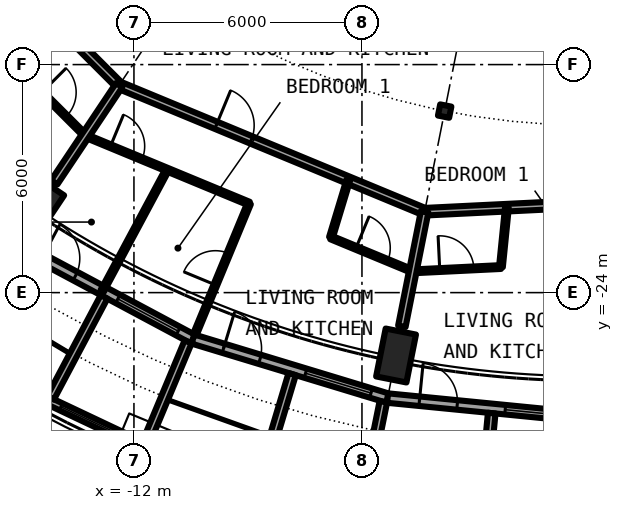
"""IFC4 building model, lengths in metres.
Left out: names, types, materials, properties, quantities, classifications, styles, units other than length and angle.
Written with IfcOpenShell. Run it as: python <this file> out.ifc"""

import sys

from ifc_helpers import new_model, si_unit, direction, frame, frame_2d, origin, origin_2d, place, context, subcontext, project, spatial, rectangle, circle, hollow_circle, i_section, extrude, element, fill, save


model = new_model("IFC4")
c1 = context("Model", 3, precision=1e-05, world=origin(), true_north=direction((0.0, 1.0)))
c2 = subcontext(c1, "Body", "Model", "MODEL_VIEW")
j1 = project(units=[si_unit("LENGTHUNIT", "METRE"), si_unit("PLANEANGLEUNIT", "RADIAN")], contexts=[c1])
p1 = place(None, origin())
s1 = spatial("IfcSite", under=j1, at=p1, CompositionType="ELEMENT")
p2 = place(p1, origin())
s2 = spatial("IfcBuilding", under=s1, at=p2, CompositionType="ELEMENT")
p3 = place(p2, frame((0.0, 0.0, 234.05)))
s3 = spatial("IfcBuildingStorey", under=s2, at=p3, CompositionType="ELEMENT", Elevation=234.05)
p4 = place(p3, frame((-14.889, -22.283, 0.0), z_axis=(0.231777820067, 0.346913947437, 0.908806775502), x_axis=(-0.831494710184, 0.555532669549, 0.0)))
e1 = element("IfcColumn", 1, at=p4, inside=s3, PredefinedType="COLUMN", context=c2, shape_type="SweptSolid", body=[
    extrude(hollow_circle(Radius=0.406, WallThickness=0.03, at=origin_2d()), origin(), (0.0, 0.0, 1.0), 3.081),
])
p5 = place(p3, frame((-5.229, -26.285, 0.0), z_axis=(0.081382632414, 0.409131968018, 0.908838764516), x_axis=(-0.980784718923, 0.195093144748, 0.0)))
e2 = element("IfcColumn", 2, at=p5, inside=s3, PredefinedType="COLUMN", context=c2, shape_type="SweptSolid", body=[
    extrude(hollow_circle(Radius=0.406, WallThickness=0.03, at=origin_2d()), origin(), (0.0, 0.0, 1.0), 3.081),
])
p6 = place(p3, frame((-3.824, -19.223, 0.0), z_axis=(0.0, 0.0, 1.0), x_axis=(-0.195090322016, -0.980785280403, 0.0)))
e3 = element("IfcColumn", 3, at=p6, inside=s3, PredefinedType="COLUMN", context=c2, shape_type="SweptSolid", body=[
    extrude(i_section(OverallWidth=0.3, OverallDepth=0.3, WebThickness=0.011, FlangeThickness=0.019, FilletRadius=0.027, at=origin_2d()), origin(), (0.0, 0.0, 1.0), 3.05),
])
p7 = place(p3, frame((-15.167, -22.699, 0.0), z_axis=(0.0, 0.0, 1.0), x_axis=(0.881915646801, -0.471407246368, 0.0)))
e4 = element("IfcWall", 4, at=p7, inside=s3, PredefinedType="SOLIDWALL", context=c2, shape_type="SweptSolid", body=[
    extrude(rectangle(XDim=5.352, YDim=0.25, at=frame_2d((2.676, 0.0))), origin(), (0.0, 0.0, 1.0), 2.7),
])
p8 = place(p7, frame((0.841, 0.0, 0.0)))
e5 = element("IfcOpeningElement", 5, at=p8, cuts=e4, PredefinedType="OPENING", context=c2, shape_type="SweptSolid", body=[
    extrude(rectangle(XDim=1.0, YDim=2.2, at=frame_2d((0.5, 1.1))), frame((0.0, 0.135, 0.0), z_axis=(0.0, -1.0, 0.0), x_axis=(1.0, 0.0, 0.0)), (0.0, 0.0, 1.0), 0.27),
])
p9 = place(p7, frame((3.111, 0.0, 0.3)))
e6 = element("IfcOpeningElement", 6, at=p9, cuts=e4, PredefinedType="OPENING", context=c2, shape_type="SweptSolid", body=[
    extrude(rectangle(XDim=1.8, YDim=2.1, at=frame_2d((0.9, 1.05))), frame((0.0, 0.135, 0.0), z_axis=(0.0, -1.0, 0.0), x_axis=(1.0, 0.0, 0.0)), (0.0, 0.0, 1.0), 0.27),
])
p10 = place(p3, frame((-14.335, -26.808, -0.03), z_axis=(0.0, 0.0, 1.0), x_axis=(0.904000060331, -0.427532327342, 0.0)))
e7 = element("IfcWall", 7, at=p10, inside=s3, PredefinedType="SOLIDWALL", context=c2, shape_type="SweptSolid", body=[
    extrude(rectangle(XDim=2.993, YDim=0.2, at=frame_2d((1.497, 0.0))), origin(), (0.0, 0.0, 1.0), 2.73),
])
p11 = place(p10, frame((0.457, 0.0, 0.33)))
e8 = element("IfcOpeningElement", 8, at=p11, cuts=e7, PredefinedType="OPENING", context=c2, shape_type="SweptSolid", body=[
    extrude(circle(Radius=1.04, at=frame_2d((1.04, 1.04))), frame((0.0, 0.11, 0.0), z_axis=(0.0, -1.0, 0.0), x_axis=(1.0, 0.0, 0.0)), (0.0, 0.0, 1.0), 0.22),
])
p12 = place(p3, frame((-12.787, -24.113, -0.03), z_axis=(0.0, 0.0, 1.0), x_axis=(-0.468365282436, -0.883534924159, 0.0)))
e9 = element("IfcWall", 9, at=p12, inside=s3, PredefinedType="SOLIDWALL", context=c2, shape_type="SweptSolid", body=[
    extrude(rectangle(XDim=3.006, YDim=0.2, at=frame_2d((1.503, 0.0))), origin(), (0.0, 0.0, 1.0), 2.73),
])
p13 = place(p3, frame((-10.575, -25.295, -0.03), z_axis=(0.0, 0.0, 1.0), x_axis=(-0.385697364644, -0.922625353492, 0.0)))
e10 = element("IfcWall", 10, at=p13, inside=s3, PredefinedType="SOLIDWALL", context=c2, shape_type="SweptSolid", body=[
    extrude(rectangle(XDim=2.883, YDim=0.2, at=frame_2d((1.442, 0.0))), origin(), (0.0, 0.0, 1.0), 2.73),
])
p14 = place(p3, frame((-10.447, -25.222, 0.0), z_axis=(0.0, 0.0, 1.0), x_axis=(0.956965678721, -0.290201119486, 0.0)))
e11 = element("IfcWall", 11, at=p14, inside=s3, PredefinedType="SOLIDWALL", context=c2, shape_type="SweptSolid", body=[
    extrude(rectangle(XDim=5.351, YDim=0.25, at=frame_2d((2.676, 0.0))), origin(), (0.0, 0.0, 1.0), 2.7),
])
p15 = place(p14, frame((0.841, 0.0, 0.0)))
e12 = element("IfcOpeningElement", 12, at=p15, cuts=e11, PredefinedType="OPENING", context=c2, shape_type="SweptSolid", body=[
    extrude(rectangle(XDim=1.0, YDim=2.2, at=frame_2d((0.5, 1.1))), frame((0.0, 0.135, 0.0), z_axis=(0.0, -1.0, 0.0), x_axis=(1.0, 0.0, 0.0)), (0.0, 0.0, 1.0), 0.27),
])
p16 = place(p14, frame((3.096, 0.0, 0.3)))
e13 = element("IfcOpeningElement", 13, at=p16, cuts=e11, PredefinedType="OPENING", context=c2, shape_type="SweptSolid", body=[
    extrude(rectangle(XDim=1.8, YDim=2.1, at=frame_2d((0.9, 1.05))), frame((0.0, 0.135, 0.0), z_axis=(0.0, -1.0, 0.0), x_axis=(1.0, 0.0, 0.0)), (0.0, 0.0, 1.0), 0.27),
])
p17 = place(p3, frame((-7.837, -26.144, -0.03), z_axis=(0.0, 0.0, 1.0), x_axis=(-0.287064767992, -0.957911174889, 0.0)))
e14 = element("IfcWall", 14, at=p17, inside=s3, PredefinedType="SOLIDWALL", context=c2, shape_type="SweptSolid", body=[
    extrude(rectangle(XDim=3.006, YDim=0.2, at=frame_2d((1.503, 0.0))), origin(), (0.0, 0.0, 1.0), 2.73),
])
p18 = place(p3, frame((-5.437, -26.872, -0.03), z_axis=(0.0, 0.0, 1.0), x_axis=(-0.198395337493, -0.980122079162, 0.0)))
e15 = element("IfcWall", 15, at=p18, inside=s3, PredefinedType="SOLIDWALL", context=c2, shape_type="SweptSolid", body=[
    extrude(rectangle(XDim=2.883, YDim=0.2, at=frame_2d((1.442, 0.0))), origin(), (0.0, 0.0, 1.0), 2.73),
])
p19 = place(p3, frame((-5.326, -26.775, 0.0), z_axis=(0.0, 0.0, 1.0), x_axis=(0.995173996315, -0.098126026407, 0.0)))
e16 = element("IfcWall", 16, at=p19, inside=s3, PredefinedType="SOLIDWALL", context=c2, shape_type="SweptSolid", body=[
    extrude(rectangle(XDim=5.352, YDim=0.25, at=frame_2d((2.676, 0.0))), origin(), (0.0, 0.0, 1.0), 2.7),
])
p20 = place(p19, frame((0.841, 0.0, 0.0)))
e17 = element("IfcOpeningElement", 17, at=p20, cuts=e16, PredefinedType="OPENING", context=c2, shape_type="SweptSolid", body=[
    extrude(rectangle(XDim=1.0, YDim=2.2, at=frame_2d((0.5, 1.1))), frame((0.0, 0.135, 0.0), z_axis=(0.0, -1.0, 0.0), x_axis=(1.0, 0.0, 0.0)), (0.0, 0.0, 1.0), 0.27),
])
p21 = place(p19, frame((3.111, 0.0, 0.3)))
e18 = element("IfcOpeningElement", 18, at=p21, cuts=e16, PredefinedType="OPENING", context=c2, shape_type="SweptSolid", body=[
    extrude(rectangle(XDim=1.8, YDim=2.1, at=frame_2d((0.9, 1.05))), frame((0.0, 0.135, 0.0), z_axis=(0.0, -1.0, 0.0), x_axis=(1.0, 0.0, 0.0)), (0.0, 0.0, 1.0), 0.27),
])
p22 = place(p3, frame((-2.586, -27.171, -0.03), z_axis=(0.0, 0.0, 1.0), x_axis=(-0.094548432284, -0.995520262954, 0.0)))
e19 = element("IfcWall", 19, at=p22, inside=s3, PredefinedType="SOLIDWALL", context=c2, shape_type="SweptSolid", body=[
    extrude(rectangle(XDim=3.006, YDim=0.2, at=frame_2d((1.503, 0.0))), origin(), (0.0, 0.0, 1.0), 2.73),
])
p23 = place(p3, frame((-14.927, -18.224, 0.0), z_axis=(0.0, 0.0, 1.0), x_axis=(0.707316201218, -0.706897299114, 0.0)))
e20 = element("IfcWall", 20, at=p23, inside=s3, PredefinedType="PARTITIONING", context=c2, shape_type="SweptSolid", body=[
    extrude(rectangle(XDim=2.331, YDim=0.1, at=frame_2d((1.166, 0.0))), origin(), (0.0, 0.0, 1.0), 2.7),
])
p24 = place(p23, frame((0.716, 0.0, 0.0)))
e21 = element("IfcOpeningElement", 21, at=p24, cuts=e20, PredefinedType="OPENING", context=c2, shape_type="SweptSolid", body=[
    extrude(rectangle(XDim=0.9, YDim=2.3, at=frame_2d((0.45, 1.15))), frame((0.0, 0.06, 0.0), z_axis=(0.0, -1.0, 0.0), x_axis=(1.0, 0.0, 0.0)), (0.0, 0.0, 1.0), 0.12),
])
p25 = place(p3, frame((-13.278, -19.873, 0.0), z_axis=(0.0, 0.0, 1.0), x_axis=(0.923920484476, -0.38258455061, 0.0)))
e22 = element("IfcWall", 22, at=p25, inside=s3, PredefinedType="PARTITIONING", context=c2, shape_type="SweptSolid", body=[
    extrude(rectangle(XDim=4.663, YDim=0.1, at=frame_2d((2.332, 0.0))), origin(), (0.0, 0.0, 1.0), 2.7),
])
p26 = place(p25, frame((0.715, 0.0, 0.0)))
e23 = element("IfcOpeningElement", 23, at=p26, cuts=e22, PredefinedType="OPENING", context=c2, shape_type="SweptSolid", body=[
    extrude(rectangle(XDim=0.9, YDim=2.3, at=frame_2d((0.45, 1.15))), frame((0.0, 0.06, 0.0), z_axis=(0.0, -1.0, 0.0), x_axis=(1.0, 0.0, 0.0)), (0.0, 0.0, 1.0), 0.12),
])
p27 = place(p3, frame((-6.817, -22.549, 0.0), z_axis=(0.0, 0.0, 1.0), x_axis=(0.923923664861, -0.382576870068, 0.0)))
e24 = element("IfcWall", 24, at=p27, inside=s3, PredefinedType="PARTITIONING", context=c2, shape_type="SweptSolid", body=[
    extrude(rectangle(XDim=2.331, YDim=0.1, at=frame_2d((1.166, 0.0))), origin(), (0.0, 0.0, 1.0), 2.7),
])
p28 = place(p27, frame((0.716, 0.0, 0.0)))
e25 = element("IfcOpeningElement", 25, at=p28, cuts=e24, PredefinedType="OPENING", context=c2, shape_type="SweptSolid", body=[
    extrude(rectangle(XDim=0.9, YDim=2.3, at=frame_2d((0.45, 1.15))), frame((0.0, 0.06, 0.0), z_axis=(0.0, -1.0, 0.0), x_axis=(1.0, 0.0, 0.0)), (0.0, 0.0, 1.0), 0.12),
])
p29 = place(p3, frame((-4.67, -23.441, 0.0), z_axis=(0.0, 0.0, 1.0), x_axis=(0.998801754813, 0.04893929488, 0.0)))
e26 = element("IfcWall", 26, at=p29, inside=s3, PredefinedType="PARTITIONING", context=c2, shape_type="SweptSolid", body=[
    extrude(rectangle(XDim=2.33, YDim=0.1, at=frame_2d((1.165, 0.0))), origin(), (0.0, 0.0, 1.0), 2.7),
])
p30 = place(p29, frame((0.718, 0.0, 0.0)))
e27 = element("IfcOpeningElement", 27, at=p30, cuts=e26, PredefinedType="OPENING", context=c2, shape_type="SweptSolid", body=[
    extrude(rectangle(XDim=0.9, YDim=2.3, at=frame_2d((0.45, 1.15))), frame((0.0, 0.06, 0.0), z_axis=(0.0, -1.0, 0.0), x_axis=(1.0, 0.0, 0.0)), (0.0, 0.0, 1.0), 0.12),
])
p31 = place(p3, frame((-18.542, -12.389, 0.0), z_axis=(0.0, 0.0, 1.0), x_axis=(0.707106781187, -0.707106781187, 0.0)))
e28 = element("IfcWall", 28, at=p31, inside=s3, PredefinedType="PARTITIONING", context=c2, shape_type="SweptSolid", body=[
    extrude(rectangle(XDim=8.702, YDim=0.2, at=frame_2d((4.351, 0.0))), origin(), (0.0, 0.0, 1.0), 2.7),
])
p32 = place(p31, frame((2.763, 0.0, 0.0)))
e29 = element("IfcOpeningElement", 29, at=p32, cuts=e28, PredefinedType="OPENING", context=c2, shape_type="SweptSolid", body=[
    extrude(rectangle(XDim=1.0, YDim=2.3, at=frame_2d((0.5, 1.15))), frame((0.0, 0.11, 0.0), z_axis=(0.0, -1.0, 0.0), x_axis=(1.0, 0.0, 0.0)), (0.0, 0.0, 1.0), 0.22),
])
p33 = place(p3, frame((-12.389, -18.542, 0.0), z_axis=(0.0, 0.0, 1.0), x_axis=(0.923867858178, -0.382711615483, 0.0)))
e30 = element("IfcWall", 30, at=p33, inside=s3, PredefinedType="PARTITIONING", context=c2, shape_type="SweptSolid", body=[
    extrude(rectangle(XDim=8.709, YDim=0.2, at=frame_2d((4.354, 0.0))), origin(), (0.0, 0.0, 1.0), 2.7),
])
p34 = place(p33, frame((2.763, 0.0, 0.0)))
e31 = element("IfcOpeningElement", 31, at=p34, cuts=e30, PredefinedType="OPENING", context=c2, shape_type="SweptSolid", body=[
    extrude(rectangle(XDim=1.0, YDim=2.3, at=frame_2d((0.5, 1.15))), frame((0.0, 0.11, 0.0), z_axis=(0.0, -1.0, 0.0), x_axis=(1.0, 0.0, 0.0)), (0.0, 0.0, 1.0), 0.22),
])
p35 = place(p3, frame((-4.358, -21.872, 0.0), z_axis=(0.0, 0.0, 1.0), x_axis=(0.998795913445, 0.049058366102, 0.0)))
e32 = element("IfcWall", 32, at=p35, inside=s3, PredefinedType="PARTITIONING", context=c2, shape_type="SweptSolid", body=[
    extrude(rectangle(XDim=10.844, YDim=0.2, at=frame_2d((5.422, 0.0))), origin(), (0.0, 0.0, 1.0), 2.7),
])
p36 = place(p35, frame((6.009, 0.0, 0.0)))
e33 = element("IfcOpeningElement", 33, at=p36, cuts=e32, PredefinedType="OPENING", context=c2, shape_type="SweptSolid", body=[
    extrude(rectangle(XDim=1.0, YDim=2.3, at=frame_2d((0.5, 1.15))), frame((0.0, 0.11, 0.0), z_axis=(0.0, -1.0, 0.0), x_axis=(1.0, 0.0, 0.0)), (0.0, 0.0, 1.0), 0.22),
])
for number, where, z_axis, x_axis in (
    (34, (-14.927, -18.224, 0.0), (0.0, 0.0, 1.0), (0.634, 0.773, 0.0)),
    (35, (-6.817, -22.549, 0.0), (0.0, 0.0, 1.0), (0.29, 0.957, 0.0)),
):
    element("IfcWall", number, at=place(p3, frame(where, z_axis=z_axis, x_axis=x_axis)), inside=s3, PredefinedType="PARTITIONING", context=c2, shape_type="SweptSolid", body=[
        extrude(rectangle(XDim=1.578, YDim=0.1, at=frame_2d((0.789, 0.0))), origin(), (0.0, 0.0, 1.0), 2.7),
    ])
p37 = place(p3, frame((-14.097, -21.097, 0.0), z_axis=(0.0, 0.0, 1.0), x_axis=(0.555763018642, 0.831340764735, 0.0)))
e36 = element("IfcWall", 36, at=p37, inside=s3, PredefinedType="PARTITIONING", context=c2, shape_type="SweptSolid", body=[
    extrude(rectangle(XDim=3.073, YDim=0.2, at=frame_2d((1.537, 0.0))), origin(), (0.0, 0.0, 1.0), 2.7),
])
p38 = place(p3, frame((-12.833, -23.954, 0.0), z_axis=(0.0, 0.0, 1.0), x_axis=(0.472212052488, 0.881484984265, 0.0)))
e37 = element("IfcWall", 37, at=p38, inside=s3, PredefinedType="PARTITIONING", context=c2, shape_type="SweptSolid", body=[
    extrude(rectangle(XDim=3.619, YDim=0.1, at=frame_2d((1.81, 0.0))), origin(), (0.0, 0.0, 1.0), 2.7),
])
p39 = place(p3, frame((-10.399, -25.106, 0.0), z_axis=(0.0, 0.0, 1.0), x_axis=(0.382669377748, 0.923885353999, 0.0)))
e38 = element("IfcWall", 38, at=p39, inside=s3, PredefinedType="PARTITIONING", context=c2, shape_type="SweptSolid", body=[
    extrude(rectangle(XDim=3.734, YDim=0.1, at=frame_2d((1.867, 0.0))), origin(), (0.0, 0.0, 1.0), 2.7),
])
p40 = place(p39, frame((1.417, 0.0, 0.0)))
e39 = element("IfcOpeningElement", 39, at=p40, cuts=e38, PredefinedType="OPENING", context=c2, shape_type="SweptSolid", body=[
    extrude(rectangle(XDim=0.9, YDim=2.3, at=frame_2d((0.45, 1.15))), frame((0.0, 0.06, 0.0), z_axis=(0.0, -1.0, 0.0), x_axis=(1.0, 0.0, 0.0)), (0.0, 0.0, 1.0), 0.12),
])
p41 = place(p3, frame((-4.95, -24.885, 0.0), z_axis=(0.0, 0.0, 1.0), x_axis=(0.194954426435, 0.980812301928, 0.0)))
e40 = element("IfcWall", 40, at=p41, inside=s3, PredefinedType="PARTITIONING", context=c2, shape_type="SweptSolid", body=[
    extrude(rectangle(XDim=3.072, YDim=0.2, at=frame_2d((1.536, 0.0))), origin(), (0.0, 0.0, 1.0), 2.7),
])
p42 = place(p3, frame((-2.343, -23.326, 0.0), z_axis=(0.0, 0.0, 1.0), x_axis=(0.100058359327, 0.994981570045, 0.0)))
e41 = element("IfcWall", 41, at=p42, inside=s3, PredefinedType="PARTITIONING", context=c2, shape_type="SweptSolid", body=[
    extrude(rectangle(XDim=1.569, YDim=0.1, at=frame_2d((0.784, 0.0))), origin(), (0.0, 0.0, 1.0), 2.7),
])
p43 = place(p8, origin())
e42 = element("IfcDoor", 42, at=p43, inside=s3, OperationType="SINGLE_SWING_LEFT", PredefinedType="DOOR", context=c2, shape_type="SweptSolid", body=[
    extrude(rectangle(XDim=1.0, YDim=2.2, at=frame_2d((0.5, 1.1))), frame((0.0, 0.025, 0.0), z_axis=(0.0, -1.0, 0.0), x_axis=(1.0, 0.0, 0.0)), (0.0, 0.0, 1.0), 0.05),
])
fill(e5, e42)
p44 = place(p9, origin())
e43 = element("IfcWindow", 43, at=p44, inside=s3, PartitioningType="SINGLE_PANEL", PredefinedType="WINDOW", context=c2, shape_type="SweptSolid", body=[
    extrude(rectangle(XDim=1.8, YDim=2.1, at=frame_2d((0.9, 1.05))), frame((0.0, 0.03, 0.0), z_axis=(0.0, -1.0, 0.0), x_axis=(1.0, 0.0, 0.0)), (0.0, 0.0, 1.0), 0.06),
])
fill(e6, e43)
p45 = place(p11, origin())
e44 = element("IfcWindow", 44, at=p45, inside=s3, PartitioningType="SINGLE_PANEL", PredefinedType="WINDOW", context=c2, shape_type="SweptSolid", body=[
    extrude(circle(Radius=1.04, at=frame_2d((1.04, 1.04))), frame((0.0, 0.03, 0.0), z_axis=(0.0, -1.0, 0.0), x_axis=(1.0, 0.0, 0.0)), (0.0, 0.0, 1.0), 0.06),
])
fill(e8, e44)
p46 = place(p15, origin())
e45 = element("IfcDoor", 45, at=p46, inside=s3, OperationType="SINGLE_SWING_LEFT", PredefinedType="DOOR", context=c2, shape_type="SweptSolid", body=[
    extrude(rectangle(XDim=1.0, YDim=2.2, at=frame_2d((0.5, 1.1))), frame((0.0, 0.025, 0.0), z_axis=(0.0, -1.0, 0.0), x_axis=(1.0, 0.0, 0.0)), (0.0, 0.0, 1.0), 0.05),
])
fill(e12, e45)
p47 = place(p16, origin())
e46 = element("IfcWindow", 46, at=p47, inside=s3, PartitioningType="SINGLE_PANEL", PredefinedType="WINDOW", context=c2, shape_type="SweptSolid", body=[
    extrude(rectangle(XDim=1.8, YDim=2.1, at=frame_2d((0.9, 1.05))), frame((0.0, 0.03, 0.0), z_axis=(0.0, -1.0, 0.0), x_axis=(1.0, 0.0, 0.0)), (0.0, 0.0, 1.0), 0.06),
])
fill(e13, e46)
p48 = place(p20, origin())
e47 = element("IfcDoor", 47, at=p48, inside=s3, OperationType="SINGLE_SWING_LEFT", PredefinedType="DOOR", context=c2, shape_type="SweptSolid", body=[
    extrude(rectangle(XDim=1.0, YDim=2.2, at=frame_2d((0.5, 1.1))), frame((0.0, 0.025, 0.0), z_axis=(0.0, -1.0, 0.0), x_axis=(1.0, 0.0, 0.0)), (0.0, 0.0, 1.0), 0.05),
])
fill(e17, e47)
p49 = place(p21, origin())
e48 = element("IfcWindow", 48, at=p49, inside=s3, PartitioningType="SINGLE_PANEL", PredefinedType="WINDOW", context=c2, shape_type="SweptSolid", body=[
    extrude(rectangle(XDim=1.8, YDim=2.1, at=frame_2d((0.9, 1.05))), frame((0.0, 0.03, 0.0), z_axis=(0.0, -1.0, 0.0), x_axis=(1.0, 0.0, 0.0)), (0.0, 0.0, 1.0), 0.06),
])
fill(e18, e48)
p50 = place(p24, origin())
e49 = element("IfcDoor", 49, at=p50, inside=s3, OperationType="SINGLE_SWING_LEFT", PredefinedType="DOOR", context=c2, shape_type="SweptSolid", body=[
    extrude(rectangle(XDim=0.9, YDim=2.3, at=frame_2d((0.45, 1.15))), frame((0.0, 0.025, 0.0), z_axis=(0.0, -1.0, 0.0), x_axis=(1.0, 0.0, 0.0)), (0.0, 0.0, 1.0), 0.05),
])
fill(e21, e49)
p51 = place(p34, origin())
e50 = element("IfcDoor", 50, at=p51, inside=s3, OperationType="SINGLE_SWING_LEFT", PredefinedType="DOOR", context=c2, shape_type="SweptSolid", body=[
    extrude(rectangle(XDim=1.0, YDim=2.3, at=frame_2d((0.5, 1.15))), frame((0.0, 0.025, 0.0), z_axis=(0.0, -1.0, 0.0), x_axis=(1.0, 0.0, 0.0)), (0.0, 0.0, 1.0), 0.05),
])
fill(e31, e50)
p52 = place(p28, origin())
e51 = element("IfcDoor", 51, at=p52, inside=s3, OperationType="SINGLE_SWING_LEFT", PredefinedType="DOOR", context=c2, shape_type="SweptSolid", body=[
    extrude(rectangle(XDim=0.9, YDim=2.3, at=frame_2d((0.45, 1.15))), frame((0.0, 0.025, 0.0), z_axis=(0.0, -1.0, 0.0), x_axis=(1.0, 0.0, 0.0)), (0.0, 0.0, 1.0), 0.05),
])
fill(e25, e51)
p53 = place(p40, origin())
e52 = element("IfcDoor", 52, at=p53, inside=s3, OperationType="SINGLE_SWING_RIGHT", PredefinedType="DOOR", context=c2, shape_type="SweptSolid", body=[
    extrude(rectangle(XDim=0.9, YDim=2.3, at=frame_2d((0.45, 1.15))), frame((0.0, 0.025, 0.0), z_axis=(0.0, -1.0, 0.0), x_axis=(1.0, 0.0, 0.0)), (0.0, 0.0, 1.0), 0.05),
])
fill(e39, e52)
p54 = place(p26, origin())
e53 = element("IfcDoor", 53, at=p54, inside=s3, OperationType="SINGLE_SWING_LEFT", PredefinedType="DOOR", context=c2, shape_type="SweptSolid", body=[
    extrude(rectangle(XDim=0.9, YDim=2.3, at=frame_2d((0.45, 1.15))), frame((0.0, 0.025, 0.0), z_axis=(0.0, -1.0, 0.0), x_axis=(1.0, 0.0, 0.0)), (0.0, 0.0, 1.0), 0.05),
])
fill(e23, e53)
p55 = place(p30, origin())
e54 = element("IfcDoor", 54, at=p55, inside=s3, OperationType="SINGLE_SWING_RIGHT", PredefinedType="DOOR", context=c2, shape_type="SweptSolid", body=[
    extrude(rectangle(XDim=0.9, YDim=2.3, at=frame_2d((0.45, 1.15))), frame((0.0, 0.025, 0.0), z_axis=(0.0, -1.0, 0.0), x_axis=(1.0, 0.0, 0.0)), (0.0, 0.0, 1.0), 0.05),
])
fill(e27, e54)
save(model, sys.argv[1])
